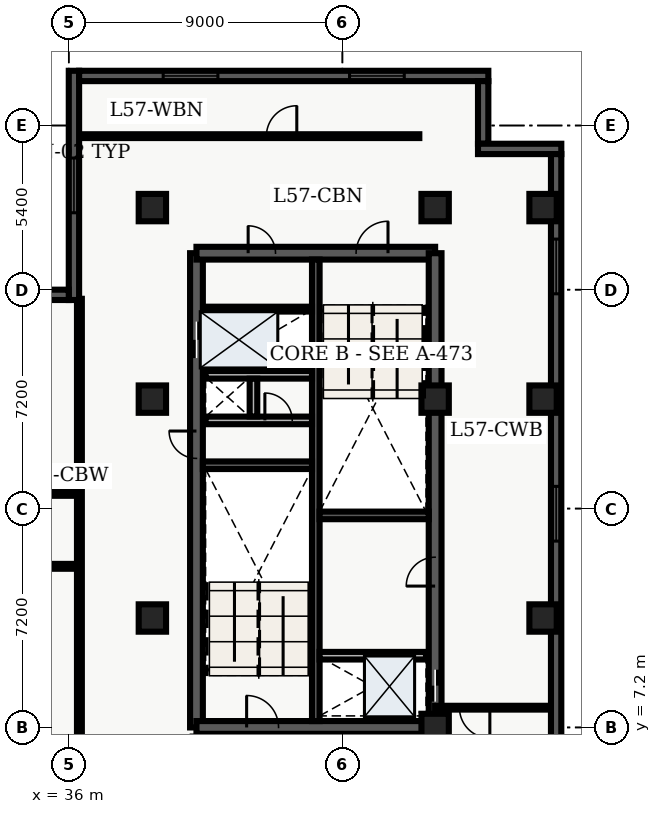
"""IFC4 building model, lengths in metres.
Left out: names, types, materials, properties, quantities, classifications, styles, units other than length and angle.
Written with IfcOpenShell. Run it as: python <this file> out.ifc"""

import sys

from ifc_helpers import new_model, entity, si_unit, converted_unit, direction, frame, origin_with_axes, origin_2d_with_axis, place, context, subcontext, project, spatial, polyline, rectangle, outline, extrude, element, fill, save


model = new_model("IFC4")
c1 = context("Model", 3, precision=1e-05, world=origin_with_axes(), true_north=direction((0.0, 1.0)))
c2 = subcontext(c1, "Body", "Model", "MODEL_VIEW")
j1 = project(units=[si_unit("LENGTHUNIT", "METRE"), converted_unit("PLANEANGLEUNIT", "DEGREE", entity("IfcPlaneAngleMeasure", 0.017), si_unit("PLANEANGLEUNIT", "RADIAN"), dimensions=[0, 0, 0, 0, 0, 0, 0])], contexts=[c1])
p1 = place(None, origin_with_axes())
s1 = spatial("IfcSite", under=j1, at=p1, CompositionType="ELEMENT")
p2 = place(p1, origin_with_axes())
s2 = spatial("IfcBuilding", under=s1, at=p2, CompositionType="ELEMENT")
p3 = place(p2, frame((0.0, 0.0, 232.5), z_axis=(0.0, 0.0, 1.0), x_axis=(1.0, 0.0, 0.0)))
s3 = spatial("IfcBuildingStorey", under=s2, at=p3, CompositionType="ELEMENT", Elevation=232.5)
p4 = place(p3, frame((40.2, 7.2, 0.0), z_axis=(0.0, 0.0, 1.0), x_axis=(0.0, 1.0, 0.0)))
e1 = element("IfcWall", 1, at=p4, inside=s3, PredefinedType="SHEAR", context=c2, shape_type="SweptSolid", body=[
    extrude(outline(polyline([(0.0, -0.21), (15.6, -0.21), (15.6, 0.21), (0.0, 0.21), (0.0, -0.21)])), origin_with_axes(), (0.0, 0.0, 1.0), 3.66),
])
p5 = place(p4, frame((12.75, 0.0, 0.0), z_axis=(0.0, 0.0, 1.0), x_axis=(1.0, 0.0, 0.0)))
e2 = element("IfcOpeningElement", 2, at=p5, cuts=e1, PredefinedType="OPENING", context=c2, shape_type="SweptSolid", body=[
    extrude(rectangle(XDim=1.2, YDim=0.44, at=origin_2d_with_axis()), origin_with_axes(), (0.0, 0.0, 1.0), 2.15),
])
p6 = place(p4, frame((9.3, 0.0, 0.0), z_axis=(0.0, 0.0, 1.0), x_axis=(1.0, 0.0, 0.0)))
e3 = element("IfcOpeningElement", 3, at=p6, cuts=e1, PredefinedType="OPENING", context=c2, shape_type="SweptSolid", body=[
    extrude(rectangle(XDim=0.9, YDim=0.44, at=origin_2d_with_axis()), origin_with_axes(), (0.0, 0.0, 1.0), 2.15),
])
p7 = place(p3, frame((40.2, 7.2, 0.0), z_axis=(0.0, 0.0, 1.0), x_axis=(1.0, 0.0, 0.0)))
e4 = element("IfcWall", 4, at=p7, inside=s3, PredefinedType="SHEAR", context=c2, shape_type="SweptSolid", body=[
    extrude(outline(polyline([(0.0, -0.21), (7.85, -0.21), (7.85, 0.21), (0.0, 0.21), (0.0, -0.21)])), origin_with_axes(), (0.0, 0.0, 1.0), 3.66),
])
p8 = place(p7, frame((2.175, 0.0, 0.0), z_axis=(0.0, 0.0, 1.0), x_axis=(1.0, 0.0, 0.0)))
e5 = element("IfcOpeningElement", 5, at=p8, cuts=e4, PredefinedType="OPENING", context=c2, shape_type="SweptSolid", body=[
    extrude(rectangle(XDim=1.05, YDim=0.44, at=origin_2d_with_axis()), origin_with_axes(), (0.0, 0.0, 1.0), 2.15),
])
p9 = place(p3, frame((40.2, 22.8, 0.0), z_axis=(0.0, 0.0, 1.0), x_axis=(1.0, 0.0, 0.0)))
e6 = element("IfcWall", 6, at=p9, inside=s3, PredefinedType="SHEAR", context=c2, shape_type="SweptSolid", body=[
    extrude(outline(polyline([(0.0, -0.21), (7.85, -0.21), (7.85, 0.21), (0.0, 0.21), (0.0, -0.21)])), origin_with_axes(), (0.0, 0.0, 1.0), 3.66),
])
p10 = place(p9, frame((5.775, 0.0, 0.0), z_axis=(0.0, 0.0, 1.0), x_axis=(1.0, 0.0, 0.0)))
e7 = element("IfcOpeningElement", 7, at=p10, cuts=e6, PredefinedType="OPENING", context=c2, shape_type="SweptSolid", body=[
    extrude(rectangle(XDim=1.05, YDim=0.44, at=origin_2d_with_axis()), origin_with_axes(), (0.0, 0.0, 1.0), 2.15),
])
p11 = place(p9, frame((2.15, 0.0, 0.0), z_axis=(0.0, 0.0, 1.0), x_axis=(1.0, 0.0, 0.0)))
e8 = element("IfcOpeningElement", 8, at=p11, cuts=e6, PredefinedType="OPENING", context=c2, shape_type="SweptSolid", body=[
    extrude(rectangle(XDim=0.9, YDim=0.44, at=origin_2d_with_axis()), origin_with_axes(), (0.0, 0.0, 1.0), 2.15),
])
p12 = place(p3, frame((48.05, 7.2, 0.0), z_axis=(0.0, 0.0, 1.0), x_axis=(0.0, 1.0, 0.0)))
e9 = element("IfcWall", 9, at=p12, inside=s3, PredefinedType="SHEAR", context=c2, shape_type="SweptSolid", body=[
    extrude(outline(polyline([(0.0, -0.21), (15.6, -0.21), (15.6, 0.21), (0.0, 0.21), (0.0, -0.21)])), origin_with_axes(), (0.0, 0.0, 1.0), 3.66),
])
p13 = place(p12, frame((1.375, 0.0, 0.0), z_axis=(0.0, 0.0, 1.0), x_axis=(1.0, 0.0, 0.0)))
e10 = element("IfcOpeningElement", 10, at=p13, cuts=e9, PredefinedType="OPENING", context=c2, shape_type="SweptSolid", body=[
    extrude(rectangle(XDim=1.05, YDim=0.44, at=origin_2d_with_axis()), origin_with_axes(), (0.0, 0.0, 1.0), 2.15),
])
p14 = place(p12, frame((5.125, 0.0, 0.0), z_axis=(0.0, 0.0, 1.0), x_axis=(1.0, 0.0, 0.0)))
e11 = element("IfcOpeningElement", 11, at=p14, cuts=e9, PredefinedType="OPENING", context=c2, shape_type="SweptSolid", body=[
    extrude(rectangle(XDim=0.95, YDim=0.44, at=origin_2d_with_axis()), origin_with_axes(), (0.0, 0.0, 1.0), 2.15),
])
p15 = place(p3, frame((44.125, 7.41, 0.0), z_axis=(0.0, 0.0, 1.0), x_axis=(0.0, 1.0, 0.0)))
e12 = element("IfcWall", 12, at=p15, inside=s3, PredefinedType="SHEAR", context=c2, shape_type="SweptSolid", body=[
    extrude(outline(polyline([(0.0, -0.125), (15.18, -0.125), (15.18, 0.125), (0.0, 0.125), (0.0, -0.125)])), origin_with_axes(), (0.0, 0.0, 1.0), 3.66),
])
for number, where, z_axis, x_axis in (
    (13, (40.41, 15.825, 0.0), (0.0, 0.0, 1.0), (1.0, 0.0, 0.0)),
    (14, (44.25, 14.175, 0.0), (0.0, 0.0, 1.0), (1.0, 0.0, 0.0)),
):
    element("IfcWall", number, at=place(p3, frame(where, z_axis=z_axis, x_axis=x_axis)), inside=s3, PredefinedType="SHEAR", context=c2, shape_type="SweptSolid", body=[
        extrude(outline(polyline([(0.0, -0.125), (3.59, -0.125), (3.59, 0.125), (0.0, 0.125), (0.0, -0.125)])), origin_with_axes(), (0.0, 0.0, 1.0), 3.66),
    ])
p16 = place(p3, frame((40.5, 17.3, 0.0), z_axis=(0.0, 0.0, 1.0), x_axis=(1.0, 0.0, 0.0)))
e15 = element("IfcWall", 15, at=p16, inside=s3, PredefinedType="SOLIDWALL", context=c2, shape_type="SweptSolid", body=[
    extrude(outline(polyline([(0.0, -0.125), (3.5, -0.125), (3.5, 0.125), (0.0, 0.125), (0.0, -0.125)])), origin_with_axes(), (0.0, 0.0, 1.0), 2.7),
])
p17 = place(p16, frame((2.4, 0.0, 0.0), z_axis=(0.0, 0.0, 1.0), x_axis=(1.0, 0.0, 0.0)))
e16 = element("IfcOpeningElement", 16, at=p17, cuts=e15, PredefinedType="OPENING", context=c2, shape_type="SweptSolid", body=[
    extrude(rectangle(XDim=0.9, YDim=0.27, at=origin_2d_with_axis()), origin_with_axes(), (0.0, 0.0, 1.0), 2.15),
])
p18 = place(p3, frame((40.5, 18.8, 0.0), z_axis=(0.0, 0.0, 1.0), x_axis=(1.0, 0.0, 0.0)))
e17 = element("IfcWall", 17, at=p18, inside=s3, PredefinedType="SOLIDWALL", context=c2, shape_type="SweptSolid", body=[
    extrude(outline(polyline([(0.0, -0.125), (3.5, -0.125), (3.5, 0.125), (0.0, 0.125), (0.0, -0.125)])), origin_with_axes(), (0.0, 0.0, 1.0), 2.7),
])
p19 = place(p3, frame((42.075, 17.43, 0.0), z_axis=(0.0, 0.0, 1.0), x_axis=(0.0, 1.0, 0.0)))
e18 = element("IfcWall", 18, at=p19, inside=s3, PredefinedType="SOLIDWALL", context=c2, shape_type="SweptSolid", body=[
    extrude(outline(polyline([(0.0, -0.125), (1.24, -0.125), (1.24, 0.125), (0.0, 0.125), (0.0, -0.125)])), origin_with_axes(), (0.0, 0.0, 1.0), 2.7),
])
for number, where, z_axis, x_axis in (
    (19, (38.75, 10.8, 0.0), (0.0, 0.0, 1.0), (1.0, 0.0, 0.0)),
    (20, (38.75, 18.0, 0.0), (0.0, 0.0, 1.0), (1.0, 0.0, 0.0)),
    (21, (38.75, 24.3, 0.0), (0.0, 0.0, 1.0), (1.0, 0.0, 0.0)),
    (22, (48.05, 7.2, 0.0), (0.0, 0.0, 1.0), (1.0, 0.0, 0.0)),
    (23, (48.05, 18.0, 0.0), (0.0, 0.0, 1.0), (1.0, 0.0, 0.0)),
    (24, (48.05, 24.3, 0.0), (0.0, 0.0, 1.0), (1.0, 0.0, 0.0)),
    (25, (51.6, 10.8, 0.0), (0.0, 0.0, 1.0), (1.0, 0.0, 0.0)),
    (26, (51.6, 18.0, 0.0), (0.0, 0.0, 1.0), (1.0, 0.0, 0.0)),
    (27, (51.6, 24.3, 0.0), (0.0, 0.0, 1.0), (1.0, 0.0, 0.0)),
):
    element("IfcColumn", number, at=place(p3, frame(where, z_axis=z_axis, x_axis=x_axis)), inside=s3, PredefinedType="COLUMN", context=c2, shape_type="SweptSolid", body=[
        extrude(rectangle(XDim=0.9, YDim=0.9, at=origin_2d_with_axis()), origin_with_axes(), (0.0, 0.0, 1.0), 3.9),
    ])
p20 = place(p3, frame((40.5, 20.96, 0.0), z_axis=(0.0, 0.0, 1.0), x_axis=(1.0, 0.0, 0.0)))
e28 = element("IfcWall", 28, at=p20, inside=s3, PredefinedType="PARTITIONING", context=c2, shape_type="SweptSolid", body=[
    extrude(outline(polyline([(0.0, -0.08), (3.5, -0.08), (3.5, 0.08), (0.0, 0.08), (0.0, -0.08)])), origin_with_axes(), (0.0, 0.0, 1.0), 2.7),
])
p21 = place(p3, frame((44.25, 9.56, 0.0), z_axis=(0.0, 0.0, 1.0), x_axis=(1.0, 0.0, 0.0)))
e29 = element("IfcWall", 29, at=p21, inside=s3, PredefinedType="SOLIDWALL", context=c2, shape_type="SweptSolid", body=[
    extrude(outline(polyline([(0.0, -0.125), (3.5, -0.125), (3.5, 0.125), (0.0, 0.125), (0.0, -0.125)])), origin_with_axes(), (0.0, 0.0, 1.0), 2.7),
])
p22 = place(p3, frame((20.3, 12.5, 0.0), z_axis=(0.0, 0.0, 1.0), x_axis=(1.0, 0.0, 0.0)))
e30 = element("IfcWall", 30, at=p22, inside=s3, PredefinedType="PARTITIONING", context=c2, shape_type="SweptSolid", body=[
    extrude(outline(polyline([(0.0, -0.08), (16.05, -0.08), (16.05, 0.08), (0.0, 0.08), (0.0, -0.08)])), origin_with_axes(), (0.0, 0.0, 1.0), 2.7),
])
p23 = place(p22, frame((2.383, 0.0, 0.0), z_axis=(0.0, 0.0, 1.0), x_axis=(1.0, 0.0, 0.0)))
e31 = element("IfcOpeningElement", 31, at=p23, cuts=e30, PredefinedType="OPENING", context=c2, shape_type="SweptSolid", body=[
    extrude(rectangle(XDim=1.2, YDim=0.18, at=origin_2d_with_axis()), origin_with_axes(), (0.0, 0.0, 1.0), 2.2),
])
p24 = place(p22, frame((7.137, 0.0, 0.0), z_axis=(0.0, 0.0, 1.0), x_axis=(1.0, 0.0, 0.0)))
e32 = element("IfcOpeningElement", 32, at=p24, cuts=e30, PredefinedType="OPENING", context=c2, shape_type="SweptSolid", body=[
    extrude(rectangle(XDim=1.0, YDim=0.18, at=origin_2d_with_axis()), origin_with_axes(), (0.0, 0.0, 1.0), 2.15),
])
p25 = place(p22, frame((12.829, 0.0, 0.0), z_axis=(0.0, 0.0, 1.0), x_axis=(1.0, 0.0, 0.0)))
e33 = element("IfcOpeningElement", 33, at=p25, cuts=e30, PredefinedType="OPENING", context=c2, shape_type="SweptSolid", body=[
    extrude(rectangle(XDim=1.0, YDim=0.18, at=origin_2d_with_axis()), origin_with_axes(), (0.0, 0.0, 1.0), 2.15),
])
p26 = place(p3, frame((20.3, 14.9, 0.0), z_axis=(0.0, 0.0, 1.0), x_axis=(1.0, 0.0, 0.0)))
e34 = element("IfcWall", 34, at=p26, inside=s3, PredefinedType="PARTITIONING", context=c2, shape_type="SweptSolid", body=[
    extrude(outline(polyline([(0.0, -0.08), (16.05, -0.08), (16.05, 0.08), (0.0, 0.08), (0.0, -0.08)])), origin_with_axes(), (0.0, 0.0, 1.0), 2.7),
])
p27 = place(p26, frame((8.075, 0.0, 0.0), z_axis=(0.0, 0.0, 1.0), x_axis=(1.0, 0.0, 0.0)))
e35 = element("IfcOpeningElement", 35, at=p27, cuts=e34, PredefinedType="OPENING", context=c2, shape_type="SweptSolid", body=[
    extrude(rectangle(XDim=1.2, YDim=0.18, at=origin_2d_with_axis()), origin_with_axes(), (0.0, 0.0, 1.0), 2.2),
])
p28 = place(p3, frame((36.35, 4.35, 0.0), z_axis=(0.0, 0.0, 1.0), x_axis=(0.0, 1.0, 0.0)))
e36 = element("IfcWall", 36, at=p28, inside=s3, PredefinedType="PARTITIONING", context=c2, shape_type="SweptSolid", body=[
    extrude(outline(polyline([(0.0, -0.08), (16.95, -0.08), (16.95, 0.08), (0.0, 0.08), (0.0, -0.08)])), origin_with_axes(), (0.0, 0.0, 1.0), 2.7),
])
p29 = place(p3, frame((51.865, 7.85, 0.0), z_axis=(0.0, 0.0, 1.0), x_axis=(-1.0, 0.0, 0.0)))
e37 = element("IfcWall", 37, at=p29, inside=s3, PredefinedType="PARTITIONING", context=c2, shape_type="SweptSolid", body=[
    extrude(outline(polyline([(0.0, -0.062), (3.815, -0.062), (3.815, 0.062), (0.0, 0.062), (0.0, -0.062)])), origin_with_axes(), (0.0, 0.0, 1.0), 2.7),
])
p30 = place(p29, frame((2.515, 0.0, 0.0), z_axis=(0.0, 0.0, 1.0), x_axis=(1.0, 0.0, 0.0)))
e38 = element("IfcOpeningElement", 38, at=p30, cuts=e37, PredefinedType="OPENING", context=c2, shape_type="SweptSolid", body=[
    extrude(rectangle(XDim=1.0, YDim=0.145, at=origin_2d_with_axis()), origin_with_axes(), (0.0, 0.0, 1.0), 2.15),
])
p31 = place(p3, frame((36.335, 26.65, 0.0), z_axis=(0.0, 0.0, 1.0), x_axis=(1.0, 0.0, 0.0)))
e39 = element("IfcWall", 39, at=p31, inside=s3, PredefinedType="PARTITIONING", context=c2, shape_type="SweptSolid", body=[
    extrude(outline(polyline([(0.0, -0.062), (11.195, -0.062), (11.195, 0.062), (0.0, 0.062), (0.0, -0.062)])), origin_with_axes(), (0.0, 0.0, 1.0), 2.7),
])
p32 = place(p31, frame((6.665, 0.0, 0.0), z_axis=(0.0, 0.0, 1.0), x_axis=(1.0, 0.0, 0.0)))
e40 = element("IfcOpeningElement", 40, at=p32, cuts=e39, PredefinedType="OPENING", context=c2, shape_type="SweptSolid", body=[
    extrude(rectangle(XDim=1.0, YDim=0.145, at=origin_2d_with_axis()), origin_with_axes(), (0.0, 0.0, 1.0), 2.15),
])
p33 = place(p3, frame((36.17, 21.26, 0.0), z_axis=(0.0, 0.0, 1.0), x_axis=(0.0, 1.0, 0.0)))
e41 = element("IfcWall", 41, at=p33, inside=s3, PredefinedType="SOLIDWALL", context=c2, shape_type="SweptSolid", body=[
    extrude(outline(polyline([(0.0, -0.17), (7.54, -0.17), (7.54, 0.17), (0.0, 0.17), (0.0, -0.17)])), origin_with_axes(), (0.0, 0.0, 1.0), 3.66),
])
p34 = place(p33, frame((3.77, 0.0, 0.45), z_axis=(0.0, 0.0, 1.0), x_axis=(1.0, 0.0, 0.0)))
e42 = element("IfcOpeningElement", 42, at=p34, cuts=e41, PredefinedType="OPENING", context=c2, shape_type="SweptSolid", body=[
    extrude(rectangle(XDim=1.8, YDim=0.36, at=origin_2d_with_axis()), origin_with_axes(), (0.0, 0.0, 1.0), 2.1),
])
p35 = place(p3, frame((36.34, 28.63, 0.0), z_axis=(0.0, 0.0, 1.0), x_axis=(1.0, 0.0, 0.0)))
e43 = element("IfcWall", 43, at=p35, inside=s3, PredefinedType="SOLIDWALL", context=c2, shape_type="SweptSolid", body=[
    extrude(outline(polyline([(0.0, -0.17), (13.46, -0.17), (13.46, 0.17), (0.0, 0.17), (0.0, -0.17)])), origin_with_axes(), (0.0, 0.0, 1.0), 3.66),
])
p36 = place(p35, frame((3.665, 0.0, 0.45), z_axis=(0.0, 0.0, 1.0), x_axis=(1.0, 0.0, 0.0)))
e44 = element("IfcOpeningElement", 44, at=p36, cuts=e43, PredefinedType="OPENING", context=c2, shape_type="SweptSolid", body=[
    extrude(rectangle(XDim=1.8, YDim=0.36, at=origin_2d_with_axis()), origin_with_axes(), (0.0, 0.0, 1.0), 2.1),
])
p37 = place(p35, frame((9.795, 0.0, 0.45), z_axis=(0.0, 0.0, 1.0), x_axis=(1.0, 0.0, 0.0)))
e45 = element("IfcOpeningElement", 45, at=p37, cuts=e43, PredefinedType="OPENING", context=c2, shape_type="SweptSolid", body=[
    extrude(rectangle(XDim=1.8, YDim=0.36, at=origin_2d_with_axis()), origin_with_axes(), (0.0, 0.0, 1.0), 2.1),
])
p38 = place(p3, frame((49.63, 28.46, 0.0), z_axis=(0.0, 0.0, 1.0), x_axis=(0.0, -1.0, 0.0)))
e46 = element("IfcWall", 46, at=p38, inside=s3, PredefinedType="SOLIDWALL", context=c2, shape_type="SweptSolid", body=[
    extrude(outline(polyline([(0.0, -0.17), (2.06, -0.17), (2.06, 0.17), (0.0, 0.17), (0.0, -0.17)])), origin_with_axes(), (0.0, 0.0, 1.0), 3.66),
])
p39 = place(p3, frame((49.46, 26.23, 0.0), z_axis=(0.0, 0.0, 1.0), x_axis=(1.0, 0.0, 0.0)))
e47 = element("IfcWall", 47, at=p39, inside=s3, PredefinedType="SOLIDWALL", context=c2, shape_type="SweptSolid", body=[
    extrude(outline(polyline([(0.0, -0.17), (2.74, -0.17), (2.74, 0.17), (0.0, 0.17), (0.0, -0.17)])), origin_with_axes(), (0.0, 0.0, 1.0), 3.66),
])
p40 = place(p3, frame((52.03, 26.06, 0.0), z_axis=(0.0, 0.0, 1.0), x_axis=(0.0, -1.0, 0.0)))
e48 = element("IfcWall", 48, at=p40, inside=s3, PredefinedType="SOLIDWALL", context=c2, shape_type="SweptSolid", body=[
    extrude(outline(polyline([(0.0, -0.17), (23.66, -0.17), (23.66, 0.17), (0.0, 0.17), (0.0, -0.17)])), origin_with_axes(), (0.0, 0.0, 1.0), 3.66),
])
p41 = place(p40, frame((3.696, 0.0, 0.45), z_axis=(0.0, 0.0, 1.0), x_axis=(1.0, 0.0, 0.0)))
e49 = element("IfcOpeningElement", 49, at=p41, cuts=e48, PredefinedType="OPENING", context=c2, shape_type="SweptSolid", body=[
    extrude(rectangle(XDim=1.8, YDim=0.36, at=origin_2d_with_axis()), origin_with_axes(), (0.0, 0.0, 1.0), 2.1),
])
p42 = place(p40, frame((11.83, 0.0, 0.45), z_axis=(0.0, 0.0, 1.0), x_axis=(1.0, 0.0, 0.0)))
e50 = element("IfcOpeningElement", 50, at=p42, cuts=e48, PredefinedType="OPENING", context=c2, shape_type="SweptSolid", body=[
    extrude(rectangle(XDim=1.8, YDim=0.36, at=origin_2d_with_axis()), origin_with_axes(), (0.0, 0.0, 1.0), 2.1),
])
p43 = place(p40, frame((20.364, 0.0, 0.45), z_axis=(0.0, 0.0, 1.0), x_axis=(1.0, 0.0, 0.0)))
e51 = element("IfcOpeningElement", 51, at=p43, cuts=e48, PredefinedType="OPENING", context=c2, shape_type="SweptSolid", body=[
    extrude(rectangle(XDim=1.8, YDim=0.36, at=origin_2d_with_axis()), origin_with_axes(), (0.0, 0.0, 1.0), 2.1),
])
p44 = place(p3, frame((32.06, 21.43, 0.0), z_axis=(0.0, 0.0, 1.0), x_axis=(1.0, 0.0, 0.0)))
e52 = element("IfcWall", 52, at=p44, inside=s3, PredefinedType="SOLIDWALL", context=c2, shape_type="SweptSolid", body=[
    extrude(outline(polyline([(0.0, -0.17), (3.94, -0.17), (3.94, 0.17), (0.0, 0.17), (0.0, -0.17)])), origin_with_axes(), (0.0, 0.0, 1.0), 3.66),
])
p45 = place(p12, frame((1.375, 0.0, 0.0), z_axis=(0.0, 0.0, 1.0), x_axis=(1.0, 0.0, 0.0)))
e53 = element("IfcDoor", 53, at=p45, inside=s3, OperationType="SLIDING_TO_LEFT", PredefinedType="DOOR", context=c2, shape_type="SweptSolid", body=[
    extrude(rectangle(XDim=1.05, YDim=0.09, at=origin_2d_with_axis()), origin_with_axes(), (0.0, 0.0, 1.0), 2.15),
])
fill(e10, e53)
p46 = place(p4, frame((12.75, 0.0, 0.0), z_axis=(0.0, 0.0, 1.0), x_axis=(1.0, 0.0, 0.0)))
e54 = element("IfcDoor", 54, at=p46, inside=s3, OperationType="DOUBLE_DOOR_SLIDING", PredefinedType="DOOR", context=c2, shape_type="SweptSolid", body=[
    extrude(rectangle(XDim=1.2, YDim=0.09, at=origin_2d_with_axis()), origin_with_axes(), (0.0, 0.0, 1.0), 2.15),
])
fill(e2, e54)
p47 = place(p4, frame((9.3, 0.0, 0.0), z_axis=(0.0, 0.0, 1.0), x_axis=(1.0, 0.0, 0.0)))
e55 = element("IfcDoor", 55, at=p47, inside=s3, OperationType="SINGLE_SWING_RIGHT", PredefinedType="DOOR", context=c2, shape_type="SweptSolid", body=[
    extrude(rectangle(XDim=0.9, YDim=0.09, at=origin_2d_with_axis()), origin_with_axes(), (0.0, 0.0, 1.0), 2.15),
])
fill(e3, e55)
p48 = place(p16, frame((2.4, 0.0, 0.0), z_axis=(0.0, 0.0, 1.0), x_axis=(1.0, 0.0, 0.0)))
e56 = element("IfcDoor", 56, at=p48, inside=s3, OperationType="SINGLE_SWING_LEFT", PredefinedType="DOOR", context=c2, shape_type="SweptSolid", body=[
    extrude(rectangle(XDim=0.9, YDim=0.09, at=origin_2d_with_axis()), origin_with_axes(), (0.0, 0.0, 1.0), 2.15),
])
fill(e16, e56)
p49 = place(p7, frame((2.175, 0.0, 0.0), z_axis=(0.0, 0.0, 1.0), x_axis=(1.0, 0.0, 0.0)))
e57 = element("IfcDoor", 57, at=p49, inside=s3, OperationType="SINGLE_SWING_LEFT", PredefinedType="DOOR", context=c2, shape_type="SweptSolid", body=[
    extrude(rectangle(XDim=1.05, YDim=0.09, at=origin_2d_with_axis()), origin_with_axes(), (0.0, 0.0, 1.0), 2.15),
])
fill(e5, e57)
p50 = place(p9, frame((5.775, 0.0, 0.0), z_axis=(0.0, 0.0, 1.0), x_axis=(1.0, 0.0, 0.0)))
e58 = element("IfcDoor", 58, at=p50, inside=s3, OperationType="SINGLE_SWING_RIGHT", PredefinedType="DOOR", context=c2, shape_type="SweptSolid", body=[
    extrude(rectangle(XDim=1.05, YDim=0.09, at=origin_2d_with_axis()), origin_with_axes(), (0.0, 0.0, 1.0), 2.15),
])
fill(e7, e58)
p51 = place(p9, frame((2.15, 0.0, 0.0), z_axis=(0.0, 0.0, 1.0), x_axis=(1.0, 0.0, 0.0)))
e59 = element("IfcDoor", 59, at=p51, inside=s3, OperationType="SINGLE_SWING_LEFT", PredefinedType="DOOR", context=c2, shape_type="SweptSolid", body=[
    extrude(rectangle(XDim=0.9, YDim=0.09, at=origin_2d_with_axis()), origin_with_axes(), (0.0, 0.0, 1.0), 2.15),
])
fill(e8, e59)
p52 = place(p12, frame((5.125, 0.0, 0.0), z_axis=(0.0, 0.0, 1.0), x_axis=(1.0, 0.0, 0.0)))
e60 = element("IfcDoor", 60, at=p52, inside=s3, OperationType="SINGLE_SWING_LEFT", PredefinedType="DOOR", context=c2, shape_type="SweptSolid", body=[
    extrude(rectangle(XDim=0.95, YDim=0.09, at=origin_2d_with_axis()), origin_with_axes(), (0.0, 0.0, 1.0), 2.15),
])
fill(e11, e60)
p53 = place(p29, frame((2.515, 0.0, 0.0), z_axis=(0.0, 0.0, 1.0), x_axis=(1.0, 0.0, 0.0)))
e61 = element("IfcDoor", 61, at=p53, inside=s3, OperationType="SINGLE_SWING_LEFT", PredefinedType="DOOR", context=c2, shape_type="SweptSolid", body=[
    extrude(rectangle(XDim=1.0, YDim=0.075, at=origin_2d_with_axis()), origin_with_axes(), (0.0, 0.0, 1.0), 2.15),
])
fill(e38, e61)
p54 = place(p31, frame((6.665, 0.0, 0.0), z_axis=(0.0, 0.0, 1.0), x_axis=(1.0, 0.0, 0.0)))
e62 = element("IfcDoor", 62, at=p54, inside=s3, OperationType="SINGLE_SWING_RIGHT", PredefinedType="DOOR", context=c2, shape_type="SweptSolid", body=[
    extrude(rectangle(XDim=1.0, YDim=0.075, at=origin_2d_with_axis()), origin_with_axes(), (0.0, 0.0, 1.0), 2.15),
])
fill(e40, e62)
p55 = place(p33, frame((3.77, 0.0, 0.45), z_axis=(0.0, 0.0, 1.0), x_axis=(1.0, 0.0, 0.0)))
e63 = element("IfcWindow", 63, at=p55, inside=s3, PredefinedType="WINDOW", context=c2, shape_type="SweptSolid", body=[
    extrude(rectangle(XDim=1.8, YDim=0.09, at=origin_2d_with_axis()), origin_with_axes(), (0.0, 0.0, 1.0), 2.1),
])
fill(e42, e63)
p56 = place(p35, frame((3.665, 0.0, 0.45), z_axis=(0.0, 0.0, 1.0), x_axis=(1.0, 0.0, 0.0)))
e64 = element("IfcWindow", 64, at=p56, inside=s3, PredefinedType="WINDOW", context=c2, shape_type="SweptSolid", body=[
    extrude(rectangle(XDim=1.8, YDim=0.09, at=origin_2d_with_axis()), origin_with_axes(), (0.0, 0.0, 1.0), 2.1),
])
fill(e44, e64)
p57 = place(p35, frame((9.795, 0.0, 0.45), z_axis=(0.0, 0.0, 1.0), x_axis=(1.0, 0.0, 0.0)))
e65 = element("IfcWindow", 65, at=p57, inside=s3, PredefinedType="WINDOW", context=c2, shape_type="SweptSolid", body=[
    extrude(rectangle(XDim=1.8, YDim=0.09, at=origin_2d_with_axis()), origin_with_axes(), (0.0, 0.0, 1.0), 2.1),
])
fill(e45, e65)
p58 = place(p40, frame((3.696, 0.0, 0.45), z_axis=(0.0, 0.0, 1.0), x_axis=(1.0, 0.0, 0.0)))
e66 = element("IfcWindow", 66, at=p58, inside=s3, PredefinedType="WINDOW", context=c2, shape_type="SweptSolid", body=[
    extrude(rectangle(XDim=1.8, YDim=0.09, at=origin_2d_with_axis()), origin_with_axes(), (0.0, 0.0, 1.0), 2.1),
])
fill(e49, e66)
p59 = place(p40, frame((11.83, 0.0, 0.45), z_axis=(0.0, 0.0, 1.0), x_axis=(1.0, 0.0, 0.0)))
e67 = element("IfcWindow", 67, at=p59, inside=s3, PredefinedType="WINDOW", context=c2, shape_type="SweptSolid", body=[
    extrude(rectangle(XDim=1.8, YDim=0.09, at=origin_2d_with_axis()), origin_with_axes(), (0.0, 0.0, 1.0), 2.1),
])
fill(e50, e67)
save(model, sys.argv[1])
